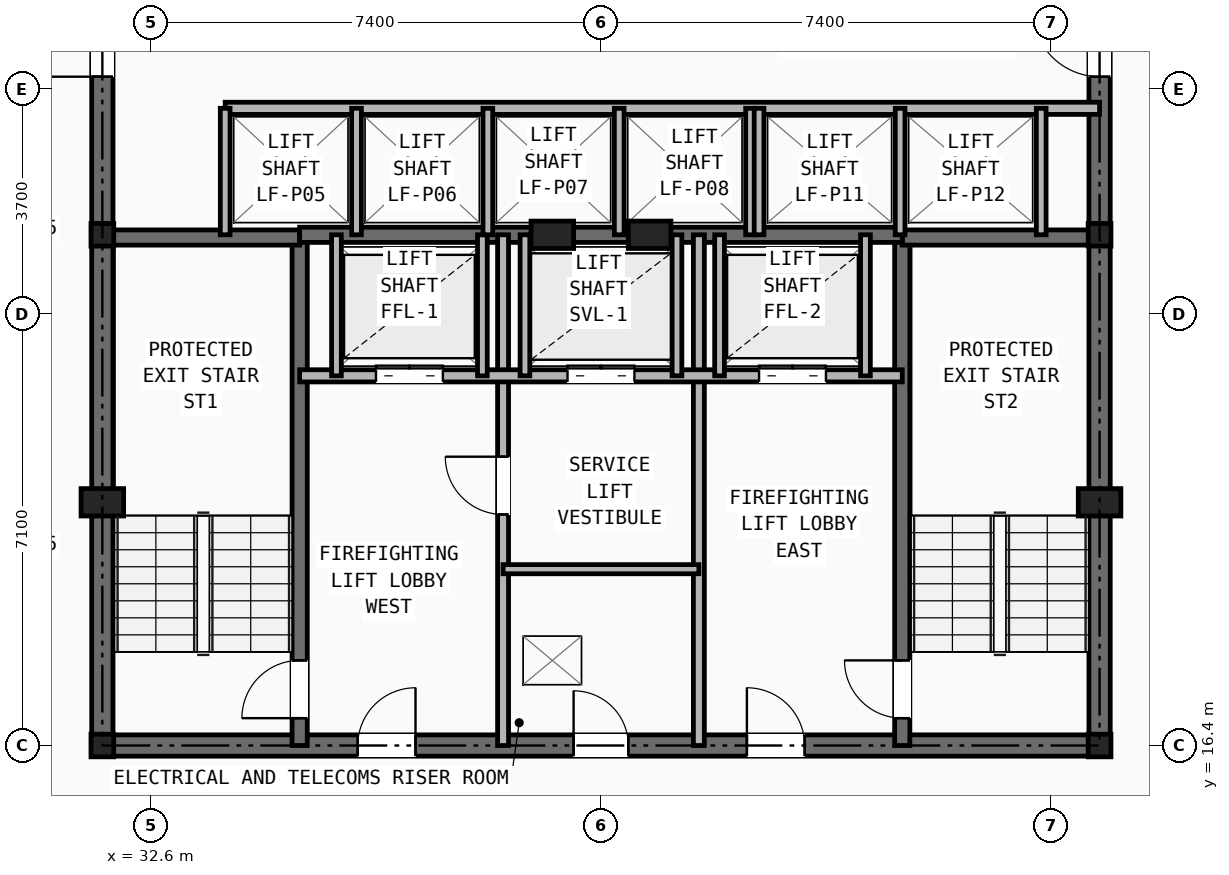
"""IFC4 building model, lengths in metres.
Left out: names, types, materials, properties, quantities, classifications, styles, units other than length and angle.
Written with IfcOpenShell. Run it as: python <this file> out.ifc"""

import sys

from ifc_helpers import new_model, si_unit, direction, frame, frame_2d, origin, origin_2d, place, context, subcontext, project, spatial, rectangle, i_section, extrude, element, fill, save


model = new_model("IFC4")
c1 = context("Model", 3, precision=1e-05, world=origin(), true_north=direction((0.0, 1.0)))
c2 = subcontext(c1, "Body", "Model", "MODEL_VIEW")
j1 = project(units=[si_unit("LENGTHUNIT", "METRE"), si_unit("PLANEANGLEUNIT", "RADIAN")], contexts=[c1])
p1 = place(None, origin())
s1 = spatial("IfcSite", under=j1, at=p1, CompositionType="ELEMENT")
p2 = place(p1, origin())
s2 = spatial("IfcBuilding", under=s1, at=p2, CompositionType="ELEMENT")
p3 = place(p2, frame((0.0, 0.0, 105.4)))
s3 = spatial("IfcBuildingStorey", under=s2, at=p3, CompositionType="ELEMENT", Elevation=105.4)
for number, where, z_axis, x_axis in (
    (1, (31.8, 16.4, 0.0), (0.0, 0.0, 1.0), (1.0, 0.0, 0.0)),
    (2, (48.2, 16.4, 0.0), (0.0, 0.0, 1.0), (1.0, 0.0, 0.0)),
    (3, (31.8, 24.8, 0.0), (0.0, 0.0, 1.0), (1.0, 0.0, 0.0)),
    (4, (48.2, 24.8, 0.0), (0.0, 0.0, 1.0), (1.0, 0.0, 0.0)),
):
    element("IfcColumn", number, at=place(p3, frame(where, z_axis=z_axis, x_axis=x_axis)), inside=s3, PredefinedType="COLUMN", context=c2, shape_type="SweptSolid", body=[
        extrude(i_section(OverallWidth=0.374, OverallDepth=0.372, WebThickness=0.016, FlangeThickness=0.026, at=origin_2d()), origin(), (0.0, 0.0, 1.0), 3.2),
    ])
for number, where, z_axis, x_axis in (
    (5, (31.8, 20.4, 0.0), (0.0, 0.0, 1.0), (1.0, 0.0, 0.0)),
    (6, (48.2, 20.4, 0.0), (0.0, 0.0, 1.0), (1.0, 0.0, 0.0)),
    (7, (39.2, 24.8, 0.0), (0.0, 0.0, 1.0), (1.0, 0.0, 0.0)),
    (8, (40.8, 24.8, 0.0), (0.0, 0.0, 1.0), (1.0, 0.0, 0.0)),
):
    element("IfcColumn", number, at=place(p3, frame(where, z_axis=z_axis, x_axis=x_axis)), inside=s3, PredefinedType="PILASTER", context=c2, shape_type="SweptSolid", body=[
        extrude(rectangle(XDim=0.7, YDim=0.45, at=origin_2d()), origin(), (0.0, 0.0, 1.0), 3.2),
    ])
p4 = place(p3, frame((31.8, 16.4, 0.0), z_axis=(0.0, 0.0, 1.0), x_axis=(1.0, 0.0, 0.0)))
e9 = element("IfcWall", 9, at=p4, inside=s3, PredefinedType="SHEAR", context=c2, shape_type="SweptSolid", body=[
    extrude(rectangle(XDim=16.4, YDim=0.35, at=frame_2d((8.2, 0.0))), origin(), (0.0, 0.0, 1.0), 2.97),
])
p5 = place(p4, frame((7.75, 0.0, 0.0)))
e10 = element("IfcOpeningElement", 10, at=p5, cuts=e9, PredefinedType="OPENING", context=c2, shape_type="SweptSolid", body=[
    extrude(rectangle(XDim=0.9, YDim=2.1, at=frame_2d((0.45, 1.05))), frame((0.0, 0.185, 0.0), z_axis=(0.0, -1.0, 0.0), x_axis=(1.0, 0.0, 0.0)), (0.0, 0.0, 1.0), 0.37),
])
p6 = place(p4, frame((4.2, 0.0, 0.0)))
e11 = element("IfcOpeningElement", 11, at=p6, cuts=e9, PredefinedType="OPENING", context=c2, shape_type="SweptSolid", body=[
    extrude(rectangle(XDim=0.95, YDim=2.1, at=frame_2d((0.475, 1.05))), frame((0.0, 0.185, 0.0), z_axis=(0.0, -1.0, 0.0), x_axis=(1.0, 0.0, 0.0)), (0.0, 0.0, 1.0), 0.37),
])
p7 = place(p4, frame((10.6, 0.0, 0.0)))
e12 = element("IfcOpeningElement", 12, at=p7, cuts=e9, PredefinedType="OPENING", context=c2, shape_type="SweptSolid", body=[
    extrude(rectangle(XDim=0.95, YDim=2.1, at=frame_2d((0.475, 1.05))), frame((0.0, 0.185, 0.0), z_axis=(0.0, -1.0, 0.0), x_axis=(1.0, 0.0, 0.0)), (0.0, 0.0, 1.0), 0.37),
])
p8 = place(p3, frame((31.8, 16.4, 0.0), z_axis=(0.0, 0.0, 1.0), x_axis=(0.0, 1.0, 0.0)))
e13 = element("IfcWall", 13, at=p8, inside=s3, PredefinedType="SHEAR", context=c2, shape_type="SweptSolid", body=[
    extrude(rectangle(XDim=14.8, YDim=0.35, at=frame_2d((7.4, 0.0))), origin(), (0.0, 0.0, 1.0), 2.97),
])
p9 = place(p8, frame((11.0, 0.0, 0.0)))
e14 = element("IfcOpeningElement", 14, at=p9, cuts=e13, PredefinedType="OPENING", context=c2, shape_type="SweptSolid", body=[
    extrude(rectangle(XDim=1.1, YDim=2.15, at=frame_2d((0.55, 1.075))), frame((0.0, 0.185, 0.0), z_axis=(0.0, -1.0, 0.0), x_axis=(1.0, 0.0, 0.0)), (0.0, 0.0, 1.0), 0.37),
])
p10 = place(p3, frame((48.2, 16.4, 0.0), z_axis=(0.0, 0.0, 1.0), x_axis=(0.0, 1.0, 0.0)))
e15 = element("IfcWall", 15, at=p10, inside=s3, PredefinedType="SHEAR", context=c2, shape_type="SweptSolid", body=[
    extrude(rectangle(XDim=14.8, YDim=0.35, at=frame_2d((7.4, 0.0))), origin(), (0.0, 0.0, 1.0), 2.97),
])
p11 = place(p10, frame((11.0, 0.0, 0.0)))
e16 = element("IfcOpeningElement", 16, at=p11, cuts=e15, PredefinedType="OPENING", context=c2, shape_type="SweptSolid", body=[
    extrude(rectangle(XDim=1.1, YDim=2.15, at=frame_2d((0.55, 1.075))), frame((0.0, 0.185, 0.0), z_axis=(0.0, -1.0, 0.0), x_axis=(1.0, 0.0, 0.0)), (0.0, 0.0, 1.0), 0.37),
])
p12 = place(p3, frame((35.045, 16.4, 0.0), z_axis=(0.0, 0.0, 1.0), x_axis=(0.0, 1.0, 0.0)))
e17 = element("IfcWall", 17, at=p12, inside=s3, PredefinedType="SHEAR", context=c2, shape_type="SweptSolid", body=[
    extrude(rectangle(XDim=8.4, YDim=0.25, at=frame_2d((4.2, 0.0))), origin(), (0.0, 0.0, 1.0), 2.97),
])
p13 = place(p12, frame((0.45, 0.0, 0.0)))
e18 = element("IfcOpeningElement", 18, at=p13, cuts=e17, PredefinedType="OPENING", context=c2, shape_type="SweptSolid", body=[
    extrude(rectangle(XDim=0.95, YDim=2.1, at=frame_2d((0.475, 1.05))), frame((0.0, 0.135, 0.0), z_axis=(0.0, -1.0, 0.0), x_axis=(1.0, 0.0, 0.0)), (0.0, 0.0, 1.0), 0.27),
])
p14 = place(p3, frame((31.8, 24.755, 0.0), z_axis=(0.0, 0.0, 1.0), x_axis=(1.0, 0.0, 0.0)))
e19 = element("IfcWall", 19, at=p14, inside=s3, PredefinedType="SHEAR", context=c2, shape_type="SweptSolid", body=[
    extrude(rectangle(XDim=3.245, YDim=0.25, at=frame_2d((1.623, 0.0))), origin(), (0.0, 0.0, 1.0), 2.97),
])
p15 = place(p3, frame((44.955, 16.4, 0.0), z_axis=(0.0, 0.0, 1.0), x_axis=(0.0, 1.0, 0.0)))
e20 = element("IfcWall", 20, at=p15, inside=s3, PredefinedType="SHEAR", context=c2, shape_type="SweptSolid", body=[
    extrude(rectangle(XDim=8.4, YDim=0.25, at=frame_2d((4.2, 0.0))), origin(), (0.0, 0.0, 1.0), 2.97),
])
p16 = place(p15, frame((0.45, 0.0, 0.0)))
e21 = element("IfcOpeningElement", 21, at=p16, cuts=e20, PredefinedType="OPENING", context=c2, shape_type="SweptSolid", body=[
    extrude(rectangle(XDim=0.95, YDim=2.1, at=frame_2d((0.475, 1.05))), frame((0.0, 0.135, 0.0), z_axis=(0.0, -1.0, 0.0), x_axis=(1.0, 0.0, 0.0)), (0.0, 0.0, 1.0), 0.27),
])
p17 = place(p3, frame((44.955, 24.755, 0.0), z_axis=(0.0, 0.0, 1.0), x_axis=(1.0, 0.0, 0.0)))
e22 = element("IfcWall", 22, at=p17, inside=s3, PredefinedType="SHEAR", context=c2, shape_type="SweptSolid", body=[
    extrude(rectangle(XDim=3.245, YDim=0.25, at=frame_2d((1.623, 0.0))), origin(), (0.0, 0.0, 1.0), 2.97),
])
p18 = place(p3, frame((35.045, 24.8, 0.0), z_axis=(0.0, 0.0, 1.0), x_axis=(1.0, 0.0, 0.0)))
e23 = element("IfcWall", 23, at=p18, inside=s3, PredefinedType="SHEAR", context=c2, shape_type="SweptSolid", body=[
    extrude(rectangle(XDim=9.91, YDim=0.25, at=frame_2d((4.955, 0.0))), origin(), (0.0, 0.0, 1.0), 2.97),
])
p19 = place(p3, frame((38.39, 16.4, 0.0), z_axis=(0.0, 0.0, 1.0), x_axis=(0.0, 1.0, 0.0)))
e24 = element("IfcWall", 24, at=p19, inside=s3, PredefinedType="PARTITIONING", context=c2, shape_type="SweptSolid", body=[
    extrude(rectangle(XDim=8.4, YDim=0.18, at=frame_2d((4.2, 0.0))), origin(), (0.0, 0.0, 1.0), 2.698),
])
p20 = place(p19, frame((3.8, 0.0, 0.0)))
e25 = element("IfcOpeningElement", 25, at=p20, cuts=e24, PredefinedType="OPENING", context=c2, shape_type="SweptSolid", body=[
    extrude(rectangle(XDim=0.95, YDim=2.1, at=frame_2d((0.475, 1.05))), frame((0.0, 0.1, 0.0), z_axis=(0.0, -1.0, 0.0), x_axis=(1.0, 0.0, 0.0)), (0.0, 0.0, 1.0), 0.2),
])
p21 = place(p3, frame((41.61, 16.4, 0.0), z_axis=(0.0, 0.0, 1.0), x_axis=(0.0, 1.0, 0.0)))
e26 = element("IfcWall", 26, at=p21, inside=s3, PredefinedType="PARTITIONING", context=c2, shape_type="SweptSolid", body=[
    extrude(rectangle(XDim=8.4, YDim=0.18, at=frame_2d((4.2, 0.0))), origin(), (0.0, 0.0, 1.0), 2.698),
])
p22 = place(p3, frame((35.045, 22.48, 0.0), z_axis=(0.0, 0.0, 1.0), x_axis=(1.0, 0.0, 0.0)))
e27 = element("IfcWall", 27, at=p22, inside=s3, PredefinedType="SOLIDWALL", context=c2, shape_type="SweptSolid", body=[
    extrude(rectangle(XDim=9.91, YDim=0.2, at=frame_2d((4.955, 0.0))), origin(), (0.0, 0.0, 1.0), 2.97),
])
p23 = place(p22, frame((1.255, 0.0, 0.0)))
e28 = element("IfcOpeningElement", 28, at=p23, cuts=e27, PredefinedType="OPENING", context=c2, shape_type="SweptSolid", body=[
    extrude(rectangle(XDim=1.1, YDim=2.15, at=frame_2d((0.55, 1.075))), frame((0.0, 0.11, 0.0), z_axis=(0.0, -1.0, 0.0), x_axis=(1.0, 0.0, 0.0)), (0.0, 0.0, 1.0), 0.22),
])
p24 = place(p22, frame((7.555, 0.0, 0.0)))
e29 = element("IfcOpeningElement", 29, at=p24, cuts=e27, PredefinedType="OPENING", context=c2, shape_type="SweptSolid", body=[
    extrude(rectangle(XDim=1.1, YDim=2.15, at=frame_2d((0.55, 1.075))), frame((0.0, 0.11, 0.0), z_axis=(0.0, -1.0, 0.0), x_axis=(1.0, 0.0, 0.0)), (0.0, 0.0, 1.0), 0.22),
])
p25 = place(p22, frame((4.405, 0.0, 0.0)))
e30 = element("IfcOpeningElement", 30, at=p25, cuts=e27, PredefinedType="OPENING", context=c2, shape_type="SweptSolid", body=[
    extrude(rectangle(XDim=1.1, YDim=2.15, at=frame_2d((0.55, 1.075))), frame((0.0, 0.11, 0.0), z_axis=(0.0, -1.0, 0.0), x_axis=(1.0, 0.0, 0.0)), (0.0, 0.0, 1.0), 0.22),
])
p26 = place(p3, frame((38.39, 19.3, 0.0), z_axis=(0.0, 0.0, 1.0), x_axis=(1.0, 0.0, 0.0)))
e31 = element("IfcWall", 31, at=p26, inside=s3, PredefinedType="PARTITIONING", context=c2, shape_type="SweptSolid", body=[
    extrude(rectangle(XDim=3.22, YDim=0.15, at=frame_2d((1.61, 0.0))), origin(), (0.0, 0.0, 1.0), 2.97),
])
for number, where, z_axis, x_axis in (
    (32, (35.65, 22.48, 0.0), (0.0, 0.0, 1.0), (0.0, 1.0, 0.0)),
    (33, (38.05, 22.48, 0.0), (0.0, 0.0, 1.0), (0.0, 1.0, 0.0)),
    (34, (41.95, 22.48, 0.0), (0.0, 0.0, 1.0), (0.0, 1.0, 0.0)),
    (35, (44.35, 22.48, 0.0), (0.0, 0.0, 1.0), (0.0, 1.0, 0.0)),
    (36, (38.75, 22.48, 0.0), (0.0, 0.0, 1.0), (0.0, 1.0, 0.0)),
    (37, (41.25, 22.48, 0.0), (0.0, 0.0, 1.0), (0.0, 1.0, 0.0)),
):
    element("IfcWall", number, at=place(p3, frame(where, z_axis=z_axis, x_axis=x_axis)), inside=s3, PredefinedType="SOLIDWALL", context=c2, shape_type="SweptSolid", body=[
        extrude(rectangle(XDim=2.32, YDim=0.16, at=frame_2d((1.16, 0.0))), origin(), (0.0, 0.0, 1.0), 2.97),
    ])
p27 = place(p3, frame((33.82, 26.88, 0.0), z_axis=(0.0, 0.0, 1.0), x_axis=(1.0, 0.0, 0.0)))
e38 = element("IfcWall", 38, at=p27, inside=s3, PredefinedType="SOLIDWALL", context=c2, shape_type="SweptSolid", body=[
    extrude(rectangle(XDim=14.38, YDim=0.2, at=frame_2d((7.19, 0.0))), origin(), (0.0, 0.0, 1.0), 2.421),
])
for number, where, z_axis, x_axis in (
    (39, (33.82, 24.8, 0.0), (0.0, 0.0, 1.0), (0.0, 1.0, 0.0)),
    (40, (35.98, 24.8, 0.0), (0.0, 0.0, 1.0), (0.0, 1.0, 0.0)),
    (41, (38.14, 24.8, 0.0), (0.0, 0.0, 1.0), (0.0, 1.0, 0.0)),
    (42, (40.3, 24.8, 0.0), (0.0, 0.0, 1.0), (0.0, 1.0, 0.0)),
    (43, (42.46, 24.8, 0.0), (0.0, 0.0, 1.0), (0.0, 1.0, 0.0)),
    (44, (42.6, 24.8, 0.0), (0.0, 0.0, 1.0), (0.0, 1.0, 0.0)),
    (45, (44.92, 24.8, 0.0), (0.0, 0.0, 1.0), (0.0, 1.0, 0.0)),
    (46, (47.24, 24.8, 0.0), (0.0, 0.0, 1.0), (0.0, 1.0, 0.0)),
):
    element("IfcWall", number, at=place(p3, frame(where, z_axis=z_axis, x_axis=x_axis)), inside=s3, PredefinedType="SOLIDWALL", context=c2, shape_type="SweptSolid", body=[
        extrude(rectangle(XDim=2.08, YDim=0.16, at=frame_2d((1.04, 0.0))), origin(), (0.0, 0.0, 1.0), 2.97),
    ])
p28 = place(p5, origin())
e47 = element("IfcDoor", 47, at=p28, inside=s3, OperationType="SINGLE_SWING_LEFT", PredefinedType="DOOR", context=c2, shape_type="SweptSolid", body=[
    extrude(rectangle(XDim=0.9, YDim=2.1, at=frame_2d((0.45, 1.05))), frame((0.0, 0.025, 0.0), z_axis=(0.0, -1.0, 0.0), x_axis=(1.0, 0.0, 0.0)), (0.0, 0.0, 1.0), 0.05),
])
fill(e10, e47)
p29 = place(p20, origin())
e48 = element("IfcDoor", 48, at=p29, inside=s3, OperationType="SINGLE_SWING_RIGHT", PredefinedType="DOOR", context=c2, shape_type="SweptSolid", body=[
    extrude(rectangle(XDim=0.95, YDim=2.1, at=frame_2d((0.475, 1.05))), frame((0.0, 0.025, 0.0), z_axis=(0.0, -1.0, 0.0), x_axis=(1.0, 0.0, 0.0)), (0.0, 0.0, 1.0), 0.05),
])
fill(e25, e48)
p30 = place(p13, origin())
e49 = element("IfcDoor", 49, at=p30, inside=s3, OperationType="SINGLE_SWING_LEFT", PredefinedType="DOOR", context=c2, shape_type="SweptSolid", body=[
    extrude(rectangle(XDim=0.95, YDim=2.1, at=frame_2d((0.475, 1.05))), frame((0.0, 0.025, 0.0), z_axis=(0.0, -1.0, 0.0), x_axis=(1.0, 0.0, 0.0)), (0.0, 0.0, 1.0), 0.05),
])
fill(e18, e49)
p31 = place(p16, origin())
e50 = element("IfcDoor", 50, at=p31, inside=s3, OperationType="SINGLE_SWING_RIGHT", PredefinedType="DOOR", context=c2, shape_type="SweptSolid", body=[
    extrude(rectangle(XDim=0.95, YDim=2.1, at=frame_2d((0.475, 1.05))), frame((0.0, 0.025, 0.0), z_axis=(0.0, -1.0, 0.0), x_axis=(1.0, 0.0, 0.0)), (0.0, 0.0, 1.0), 0.05),
])
fill(e21, e50)
p32 = place(p6, origin())
e51 = element("IfcDoor", 51, at=p32, inside=s3, OperationType="SINGLE_SWING_RIGHT", PredefinedType="DOOR", context=c2, shape_type="SweptSolid", body=[
    extrude(rectangle(XDim=0.95, YDim=2.1, at=frame_2d((0.475, 1.05))), frame((0.0, 0.025, 0.0), z_axis=(0.0, -1.0, 0.0), x_axis=(1.0, 0.0, 0.0)), (0.0, 0.0, 1.0), 0.05),
])
fill(e11, e51)
p33 = place(p7, origin())
e52 = element("IfcDoor", 52, at=p33, inside=s3, OperationType="SINGLE_SWING_LEFT", PredefinedType="DOOR", context=c2, shape_type="SweptSolid", body=[
    extrude(rectangle(XDim=0.95, YDim=2.1, at=frame_2d((0.475, 1.05))), frame((0.0, 0.025, 0.0), z_axis=(0.0, -1.0, 0.0), x_axis=(1.0, 0.0, 0.0)), (0.0, 0.0, 1.0), 0.05),
])
fill(e12, e52)
p34 = place(p23, origin())
e53 = element("IfcDoor", 53, at=p34, inside=s3, OperationType="DOUBLE_DOOR_SLIDING", PredefinedType="DOOR", context=c2, shape_type="SweptSolid", body=[
    extrude(rectangle(XDim=1.1, YDim=2.15, at=frame_2d((0.55, 1.075))), frame((0.0, 0.025, 0.0), z_axis=(0.0, -1.0, 0.0), x_axis=(1.0, 0.0, 0.0)), (0.0, 0.0, 1.0), 0.05),
])
fill(e28, e53)
p35 = place(p24, origin())
e54 = element("IfcDoor", 54, at=p35, inside=s3, OperationType="DOUBLE_DOOR_SLIDING", PredefinedType="DOOR", context=c2, shape_type="SweptSolid", body=[
    extrude(rectangle(XDim=1.1, YDim=2.15, at=frame_2d((0.55, 1.075))), frame((0.0, 0.025, 0.0), z_axis=(0.0, -1.0, 0.0), x_axis=(1.0, 0.0, 0.0)), (0.0, 0.0, 1.0), 0.05),
])
fill(e29, e54)
p36 = place(p25, origin())
e55 = element("IfcDoor", 55, at=p36, inside=s3, OperationType="DOUBLE_DOOR_SLIDING", PredefinedType="DOOR", context=c2, shape_type="SweptSolid", body=[
    extrude(rectangle(XDim=1.1, YDim=2.15, at=frame_2d((0.55, 1.075))), frame((0.0, 0.025, 0.0), z_axis=(0.0, -1.0, 0.0), x_axis=(1.0, 0.0, 0.0)), (0.0, 0.0, 1.0), 0.05),
])
fill(e30, e55)
p37 = place(p9, origin())
e56 = element("IfcDoor", 56, at=p37, inside=s3, OperationType="SINGLE_SWING_LEFT", PredefinedType="DOOR", context=c2, shape_type="SweptSolid", body=[
    extrude(rectangle(XDim=1.1, YDim=2.15, at=frame_2d((0.55, 1.075))), frame((0.0, 0.025, 0.0), z_axis=(0.0, -1.0, 0.0), x_axis=(1.0, 0.0, 0.0)), (0.0, 0.0, 1.0), 0.05),
])
fill(e14, e56)
p38 = place(p11, origin())
e57 = element("IfcDoor", 57, at=p38, inside=s3, OperationType="SINGLE_SWING_RIGHT", PredefinedType="DOOR", context=c2, shape_type="SweptSolid", body=[
    extrude(rectangle(XDim=1.1, YDim=2.15, at=frame_2d((0.55, 1.075))), frame((0.0, 0.025, 0.0), z_axis=(0.0, -1.0, 0.0), x_axis=(1.0, 0.0, 0.0)), (0.0, 0.0, 1.0), 0.05),
])
fill(e16, e57)
save(model, sys.argv[1])
